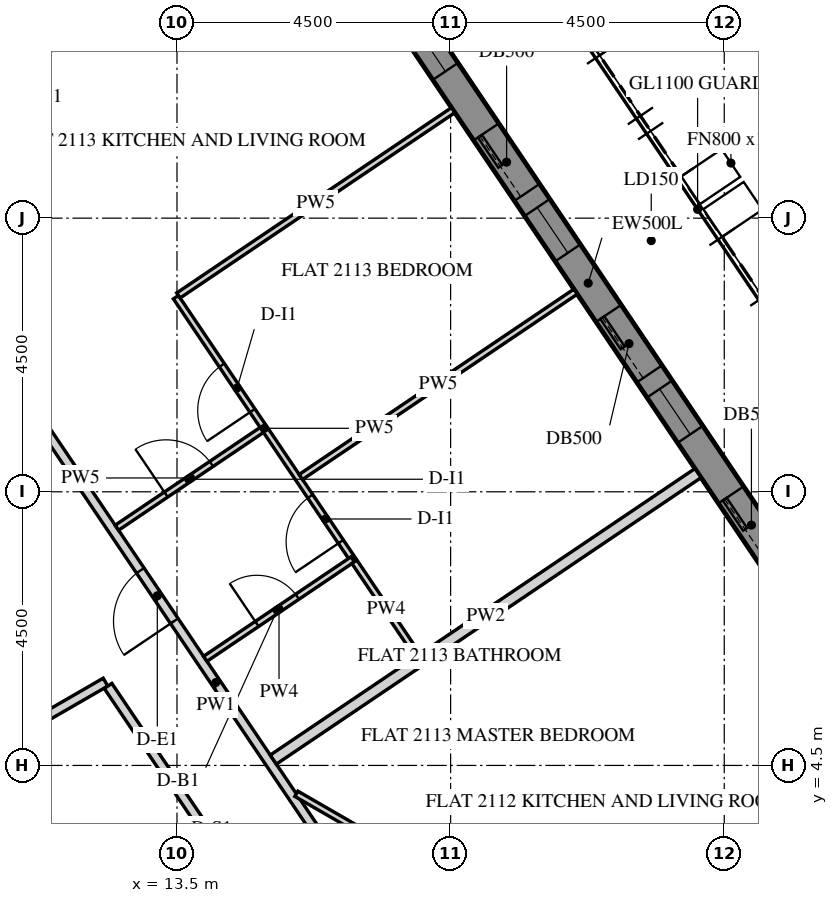
"""IFC4 building model, lengths in metres.
Left out: names, types, materials, properties, quantities, classifications, styles, units other than length and angle.
Written with IfcOpenShell. Run it as: python <this file> out.ifc"""

import sys

from ifc_helpers import new_model, si_unit, direction, frame, frame_2d, origin, place, context, subcontext, project, spatial, polyline, rectangle, outline, extrude, element, fill, save


model = new_model("IFC4")
c1 = context("Model", 3, precision=1e-05, world=origin(), true_north=direction((0.0, 1.0)))
c2 = subcontext(c1, "Body", "Model", "MODEL_VIEW")
j1 = project(units=[si_unit("LENGTHUNIT", "METRE"), si_unit("PLANEANGLEUNIT", "RADIAN")], contexts=[c1])
p1 = place(None, origin())
s1 = spatial("IfcSite", under=j1, at=p1, CompositionType="ELEMENT")
p2 = place(p1, origin())
s2 = spatial("IfcBuilding", under=s1, at=p2, CompositionType="ELEMENT")
p3 = place(p2, frame((0.0, 0.0, 267.9)))
s3 = spatial("IfcBuildingStorey", under=s2, at=p3, CompositionType="ELEMENT", Elevation=267.9)
p4 = place(p3, frame((26.706, 2.879, -0.15), z_axis=(0.0, 0.0, 1.0), x_axis=(-0.559197891507, 0.829034208061, 0.0)))
e1 = element("IfcWall", 1, at=p4, inside=s3, PredefinedType="SOLIDWALL", context=c2, shape_type="SweptSolid", body=[
    extrude(outline(polyline([(0.25, -0.25), (22.795, -0.25), (23.295, 0.25), (-0.25, 0.25), (0.25, -0.25)])), origin(), (0.0, 0.0, 1.0), 3.9),
])
p5 = place(p4, frame((1.323, 0.0, 1.05)))
e2 = element("IfcOpeningElement", 2, at=p5, cuts=e1, PredefinedType="OPENING", context=c2, shape_type="SweptSolid", body=[
    extrude(rectangle(XDim=0.9, YDim=1.5, at=frame_2d((0.45, 0.75))), frame((0.0, 0.26, 0.0), z_axis=(0.0, -1.0, 0.0), x_axis=(1.0, 0.0, 0.0)), (0.0, 0.0, 1.0), 0.52),
])
p6 = place(p4, frame((2.522, 0.0, 0.15)))
e3 = element("IfcOpeningElement", 3, at=p6, cuts=e1, PredefinedType="OPENING", context=c2, shape_type="SweptSolid", body=[
    extrude(rectangle(XDim=1.2, YDim=2.4, at=frame_2d((0.6, 1.2))), frame((0.0, 0.26, 0.0), z_axis=(0.0, -1.0, 0.0), x_axis=(1.0, 0.0, 0.0)), (0.0, 0.0, 1.0), 0.52),
])
p7 = place(p4, frame((4.922, 0.0, 1.05)))
e4 = element("IfcOpeningElement", 4, at=p7, cuts=e1, PredefinedType="OPENING", context=c2, shape_type="SweptSolid", body=[
    extrude(rectangle(XDim=0.9, YDim=1.5, at=frame_2d((0.45, 0.75))), frame((0.0, 0.26, 0.0), z_axis=(0.0, -1.0, 0.0), x_axis=(1.0, 0.0, 0.0)), (0.0, 0.0, 1.0), 0.52),
])
p8 = place(p4, frame((6.122, 0.0, 0.15)))
e5 = element("IfcOpeningElement", 5, at=p8, cuts=e1, PredefinedType="OPENING", context=c2, shape_type="SweptSolid", body=[
    extrude(rectangle(XDim=1.2, YDim=2.4, at=frame_2d((0.6, 1.2))), frame((0.0, 0.26, 0.0), z_axis=(0.0, -1.0, 0.0), x_axis=(1.0, 0.0, 0.0)), (0.0, 0.0, 1.0), 0.52),
])
p9 = place(p4, frame((8.522, 0.0, 1.05)))
e6 = element("IfcOpeningElement", 6, at=p9, cuts=e1, PredefinedType="OPENING", context=c2, shape_type="SweptSolid", body=[
    extrude(rectangle(XDim=0.9, YDim=1.5, at=frame_2d((0.45, 0.75))), frame((0.0, 0.26, 0.0), z_axis=(0.0, -1.0, 0.0), x_axis=(1.0, 0.0, 0.0)), (0.0, 0.0, 1.0), 0.52),
])
p10 = place(p4, frame((9.722, 0.0, 0.15)))
e7 = element("IfcOpeningElement", 7, at=p10, cuts=e1, PredefinedType="OPENING", context=c2, shape_type="SweptSolid", body=[
    extrude(rectangle(XDim=1.2, YDim=2.4, at=frame_2d((0.6, 1.2))), frame((0.0, 0.26, 0.0), z_axis=(0.0, -1.0, 0.0), x_axis=(1.0, 0.0, 0.0)), (0.0, 0.0, 1.0), 0.52),
])
p11 = place(p4, frame((12.122, 0.0, 1.05)))
e8 = element("IfcOpeningElement", 8, at=p11, cuts=e1, PredefinedType="OPENING", context=c2, shape_type="SweptSolid", body=[
    extrude(rectangle(XDim=0.9, YDim=1.5, at=frame_2d((0.45, 0.75))), frame((0.0, 0.26, 0.0), z_axis=(0.0, -1.0, 0.0), x_axis=(1.0, 0.0, 0.0)), (0.0, 0.0, 1.0), 0.52),
])
p12 = place(p4, frame((13.323, 0.0, 0.15)))
e9 = element("IfcOpeningElement", 9, at=p12, cuts=e1, PredefinedType="OPENING", context=c2, shape_type="SweptSolid", body=[
    extrude(rectangle(XDim=1.2, YDim=2.4, at=frame_2d((0.6, 1.2))), frame((0.0, 0.26, 0.0), z_axis=(0.0, -1.0, 0.0), x_axis=(1.0, 0.0, 0.0)), (0.0, 0.0, 1.0), 0.52),
])
p13 = place(p4, frame((15.722, 0.0, 1.05)))
e10 = element("IfcOpeningElement", 10, at=p13, cuts=e1, PredefinedType="OPENING", context=c2, shape_type="SweptSolid", body=[
    extrude(rectangle(XDim=0.9, YDim=1.5, at=frame_2d((0.45, 0.75))), frame((0.0, 0.26, 0.0), z_axis=(0.0, -1.0, 0.0), x_axis=(1.0, 0.0, 0.0)), (0.0, 0.0, 1.0), 0.52),
])
p14 = place(p4, frame((16.922, 0.0, 0.15)))
e11 = element("IfcOpeningElement", 11, at=p14, cuts=e1, PredefinedType="OPENING", context=c2, shape_type="SweptSolid", body=[
    extrude(rectangle(XDim=1.2, YDim=2.4, at=frame_2d((0.6, 1.2))), frame((0.0, 0.26, 0.0), z_axis=(0.0, -1.0, 0.0), x_axis=(1.0, 0.0, 0.0)), (0.0, 0.0, 1.0), 0.52),
])
p15 = place(p4, frame((19.323, 0.0, 1.05)))
e12 = element("IfcOpeningElement", 12, at=p15, cuts=e1, PredefinedType="OPENING", context=c2, shape_type="SweptSolid", body=[
    extrude(rectangle(XDim=0.9, YDim=1.5, at=frame_2d((0.45, 0.75))), frame((0.0, 0.26, 0.0), z_axis=(0.0, -1.0, 0.0), x_axis=(1.0, 0.0, 0.0)), (0.0, 0.0, 1.0), 0.52),
])
p16 = place(p4, frame((20.522, 0.0, 0.15)))
e13 = element("IfcOpeningElement", 13, at=p16, cuts=e1, PredefinedType="OPENING", context=c2, shape_type="SweptSolid", body=[
    extrude(rectangle(XDim=1.2, YDim=2.4, at=frame_2d((0.6, 1.2))), frame((0.0, 0.26, 0.0), z_axis=(0.0, -1.0, 0.0), x_axis=(1.0, 0.0, 0.0)), (0.0, 0.0, 1.0), 0.52),
])
p17 = place(p3, frame((12.471, 0.0, -0.15), z_axis=(0.0, 0.0, 1.0), x_axis=(-0.499996419489, 0.866027470984, 0.0)))
e14 = element("IfcWall", 14, at=p17, inside=s3, PredefinedType="SHEAR", context=c2, shape_type="SweptSolid", body=[
    extrude(outline(polyline([(-0.115, -0.2), (12.586, -0.2), (12.355, 0.2), (0.115, 0.2), (-0.115, -0.2)])), origin(), (0.0, 0.0, 1.0), 3.9),
])
p18 = place(p17, frame((5.306, 0.0, 0.15)))
e15 = element("IfcOpeningElement", 15, at=p18, cuts=e14, PredefinedType="OPENING", context=c2, shape_type="SweptSolid", body=[
    extrude(rectangle(XDim=1.8, YDim=2.4, at=frame_2d((0.9, 1.2))), frame((0.0, 0.21, 0.0), z_axis=(0.0, -1.0, 0.0), x_axis=(1.0, 0.0, 0.0)), (0.0, 0.0, 1.0), 0.42),
])
p19 = place(p3, frame((6.351, 11.0, -0.15), z_axis=(0.0, 0.0, 1.0), x_axis=(0.499998894578, 0.866026041999, 0.0)))
e16 = element("IfcWall", 16, at=p19, inside=s3, PredefinedType="SHEAR", context=c2, shape_type="SweptSolid", body=[
    extrude(rectangle(XDim=15.544, YDim=0.4, at=frame_2d((7.772, 0.0))), origin(), (0.0, 0.0, 1.0), 3.9),
])
p20 = place(p19, frame((6.872, 0.0, 0.15)))
e17 = element("IfcOpeningElement", 17, at=p20, cuts=e16, PredefinedType="OPENING", context=c2, shape_type="SweptSolid", body=[
    extrude(rectangle(XDim=1.8, YDim=2.4, at=frame_2d((0.9, 1.2))), frame((0.0, 0.21, 0.0), z_axis=(0.0, -1.0, 0.0), x_axis=(1.0, 0.0, 0.0)), (0.0, 0.0, 1.0), 0.42),
])
p21 = place(p3, frame((18.875, -1.158, 0.0), z_axis=(0.0, 0.0, 1.0), x_axis=(-0.55919880344, 0.829033592945, 0.0)))
e18 = element("IfcWall", 18, at=p21, inside=s3, PredefinedType="PARTITIONING", context=c2, shape_type="SweptSolid", body=[
    extrude(rectangle(XDim=16.939, YDim=0.15, at=frame_2d((8.47, 0.0))), origin(), (0.0, 0.0, 1.0), 2.988),
])
p22 = place(p21, frame((9.69, 0.0, 0.0)))
e19 = element("IfcOpeningElement", 19, at=p22, cuts=e18, PredefinedType="OPENING", context=c2, shape_type="SweptSolid", body=[
    extrude(rectangle(XDim=1.0, YDim=2.1, at=frame_2d((0.5, 1.05))), frame((0.0, 0.085, 0.0), z_axis=(0.0, -1.0, 0.0), x_axis=(1.0, 0.0, 0.0)), (0.0, 0.0, 1.0), 0.17),
])
p23 = place(p3, frame((9.444, 12.957, 0.0), z_axis=(0.0, 0.0, 1.0), x_axis=(0.500004967958, 0.866022535513, 0.0)))
e20 = element("IfcWall", 20, at=p23, inside=s3, PredefinedType="PARTITIONING", context=c2, shape_type="SweptSolid", body=[
    extrude(rectangle(XDim=7.431, YDim=0.15, at=frame_2d((3.715, 0.0))), origin(), (0.0, 0.0, 1.0), 2.988),
])
p24 = place(p3, frame((10.066, 4.566, 0.0), z_axis=(0.0, 0.0, 1.0), x_axis=(0.866034402474, 0.499984413489, 0.0)))
e21 = element("IfcWall", 21, at=p24, inside=s3, PredefinedType="PARTITIONING", context=c2, shape_type="SweptSolid", body=[
    extrude(rectangle(XDim=2.608, YDim=0.15, at=frame_2d((1.304, 0.0))), origin(), (0.0, 0.0, 1.0), 2.988),
])
p25 = place(p3, frame((12.367, 5.808, 0.0), z_axis=(0.0, 0.0, 1.0), x_axis=(0.559187256666, -0.829041381345, 0.0)))
e22 = element("IfcWall", 22, at=p25, inside=s3, PredefinedType="PARTITIONING", context=c2, shape_type="SweptSolid", body=[
    extrude(rectangle(XDim=8.56, YDim=0.15, at=frame_2d((4.28, 0.0))), origin(), (0.0, 0.0, 1.0), 2.988),
])
p26 = place(p25, frame((3.83, 0.0, 0.0)))
e23 = element("IfcOpeningElement", 23, at=p26, cuts=e22, PredefinedType="OPENING", context=c2, shape_type="SweptSolid", body=[
    extrude(rectangle(XDim=0.9, YDim=2.1, at=frame_2d((0.45, 1.05))), frame((0.0, 0.085, 0.0), z_axis=(0.0, -1.0, 0.0), x_axis=(1.0, 0.0, 0.0)), (0.0, 0.0, 1.0), 0.17),
])
p27 = place(p3, frame((15.463, 4.034, 0.0), z_axis=(0.0, 0.0, 1.0), x_axis=(0.866033324905, -0.499986279965, 0.0)))
e24 = element("IfcWall", 24, at=p27, inside=s3, PredefinedType="PARTITIONING", context=c2, shape_type="SweptSolid", body=[
    extrude(rectangle(XDim=9.426, YDim=0.1, at=frame_2d((4.713, 0.0))), origin(), (0.0, 0.0, 1.0), 2.988),
])
p28 = place(p3, frame((22.069, 9.307, 0.0), z_axis=(0.0, 0.0, 1.0), x_axis=(-0.829046823816, -0.559179187668, 0.0)))
e25 = element("IfcWall", 25, at=p28, inside=s3, PredefinedType="PARTITIONING", context=c2, shape_type="SweptSolid", body=[
    extrude(rectangle(XDim=8.425, YDim=0.18, at=frame_2d((4.213, 0.0))), origin(), (0.0, 0.0, 1.0), 2.988),
])
p29 = place(p3, frame((12.511, 8.409, 0.0), z_axis=(0.0, 0.0, 1.0), x_axis=(0.829072128826, 0.559141668278, 0.0)))
e26 = element("IfcWall", 26, at=p29, inside=s3, PredefinedType="PARTITIONING", context=c2, shape_type="SweptSolid", body=[
    extrude(rectangle(XDim=2.925, YDim=0.1, at=frame_2d((1.462, 0.0))), origin(), (0.0, 0.0, 1.0), 2.988),
])
p30 = place(p29, frame((0.975, 0.0, 0.0)))
e27 = element("IfcOpeningElement", 27, at=p30, cuts=e26, PredefinedType="OPENING", context=c2, shape_type="SweptSolid", body=[
    extrude(rectangle(XDim=0.9, YDim=2.1, at=frame_2d((0.45, 1.05))), frame((0.0, 0.06, 0.0), z_axis=(0.0, -1.0, 0.0), x_axis=(1.0, 0.0, 0.0)), (0.0, 0.0, 1.0), 0.12),
])
p31 = place(p3, frame((16.392, 7.888, 0.0), z_axis=(0.0, 0.0, 1.0), x_axis=(-0.559208437152, 0.829027094743, 0.0)))
e28 = element("IfcWall", 28, at=p31, inside=s3, PredefinedType="PARTITIONING", context=c2, shape_type="SweptSolid", body=[
    extrude(rectangle(XDim=5.202, YDim=0.1, at=frame_2d((2.601, 0.0))), origin(), (0.0, 0.0, 1.0), 2.988),
])
p32 = place(p31, frame((0.352, 0.0, 0.0)))
e29 = element("IfcOpeningElement", 29, at=p32, cuts=e28, PredefinedType="OPENING", context=c2, shape_type="SweptSolid", body=[
    extrude(rectangle(XDim=0.9, YDim=2.1, at=frame_2d((0.45, 1.05))), frame((0.0, 0.06, 0.0), z_axis=(0.0, -1.0, 0.0), x_axis=(1.0, 0.0, 0.0)), (0.0, 0.0, 1.0), 0.12),
])
p33 = place(p31, frame((2.952, 0.0, 0.0)))
e30 = element("IfcOpeningElement", 30, at=p33, cuts=e28, PredefinedType="OPENING", context=c2, shape_type="SweptSolid", body=[
    extrude(rectangle(XDim=0.9, YDim=2.1, at=frame_2d((0.45, 1.05))), frame((0.0, 0.06, 0.0), z_axis=(0.0, -1.0, 0.0), x_axis=(1.0, 0.0, 0.0)), (0.0, 0.0, 1.0), 0.12),
])
p34 = place(p3, frame((13.524, 12.229, 0.0), z_axis=(0.0, 0.0, 1.0), x_axis=(0.829026245862, 0.559209695617, 0.0)))
e31 = element("IfcWall", 31, at=p34, inside=s3, PredefinedType="PARTITIONING", context=c2, shape_type="SweptSolid", body=[
    extrude(rectangle(XDim=5.45, YDim=0.1, at=frame_2d((2.725, 0.0))), origin(), (0.0, 0.0, 1.0), 2.988),
])
p35 = place(p3, frame((13.966, 6.254, 0.0), z_axis=(0.0, 0.0, 1.0), x_axis=(0.829046031219, 0.559180362781, 0.0)))
e32 = element("IfcWall", 32, at=p35, inside=s3, PredefinedType="PARTITIONING", context=c2, shape_type="SweptSolid", body=[
    extrude(rectangle(XDim=2.925, YDim=0.1, at=frame_2d((1.462, 0.0))), origin(), (0.0, 0.0, 1.0), 2.988),
])
p36 = place(p35, frame((1.025, 0.0, 0.0)))
e33 = element("IfcOpeningElement", 33, at=p36, cuts=e32, PredefinedType="OPENING", context=c2, shape_type="SweptSolid", body=[
    extrude(rectangle(XDim=0.8, YDim=2.1, at=frame_2d((0.4, 1.05))), frame((0.0, 0.06, 0.0), z_axis=(0.0, -1.0, 0.0), x_axis=(1.0, 0.0, 0.0)), (0.0, 0.0, 1.0), 0.12),
])
p37 = place(p3, frame((17.458, 6.306, 0.0), z_axis=(0.0, 0.0, 1.0), x_axis=(-0.559200351269, 0.829032548903, 0.0)))
e34 = element("IfcWall", 34, at=p37, inside=s3, PredefinedType="PARTITIONING", context=c2, shape_type="SweptSolid", body=[
    extrude(rectangle(XDim=1.862, YDim=0.1, at=frame_2d((0.931, 0.0))), origin(), (0.0, 0.0, 1.0), 2.988),
])
p38 = place(p3, frame((20.055, 12.292, 0.0), z_axis=(0.0, 0.0, 1.0), x_axis=(-0.829040254016, -0.559188928021, 0.0)))
e35 = element("IfcWall", 35, at=p38, inside=s3, PredefinedType="PARTITIONING", context=c2, shape_type="SweptSolid", body=[
    extrude(rectangle(XDim=5.45, YDim=0.1, at=frame_2d((2.725, 0.0))), origin(), (0.0, 0.0, 1.0), 2.988),
])
p39 = place(p8, frame((0.0, 0.175, 0.0)))
e36 = element("IfcDoor", 36, at=p39, inside=s3, OperationType="SLIDING_TO_LEFT", PredefinedType="DOOR", context=c2, shape_type="SweptSolid", body=[
    extrude(rectangle(XDim=1.2, YDim=2.4, at=frame_2d((0.6, 1.2))), frame((0.0, 0.025, 0.0), z_axis=(0.0, -1.0, 0.0), x_axis=(1.0, 0.0, 0.0)), (0.0, 0.0, 1.0), 0.05),
])
fill(e5, e36)
p40 = place(p9, frame((0.0, 0.18, 0.0)))
e37 = element("IfcWindow", 37, at=p40, inside=s3, PartitioningType="SINGLE_PANEL", PredefinedType="WINDOW", context=c2, shape_type="SweptSolid", body=[
    extrude(rectangle(XDim=0.9, YDim=1.5, at=frame_2d((0.45, 0.75))), frame((0.0, 0.03, 0.0), z_axis=(0.0, -1.0, 0.0), x_axis=(1.0, 0.0, 0.0)), (0.0, 0.0, 1.0), 0.06),
])
fill(e6, e37)
p41 = place(p10, frame((0.0, 0.175, 0.0)))
e38 = element("IfcDoor", 38, at=p41, inside=s3, OperationType="SLIDING_TO_LEFT", PredefinedType="DOOR", context=c2, shape_type="SweptSolid", body=[
    extrude(rectangle(XDim=1.2, YDim=2.4, at=frame_2d((0.6, 1.2))), frame((0.0, 0.025, 0.0), z_axis=(0.0, -1.0, 0.0), x_axis=(1.0, 0.0, 0.0)), (0.0, 0.0, 1.0), 0.05),
])
fill(e7, e38)
p42 = place(p11, frame((0.0, 0.18, 0.0)))
e39 = element("IfcWindow", 39, at=p42, inside=s3, PartitioningType="SINGLE_PANEL", PredefinedType="WINDOW", context=c2, shape_type="SweptSolid", body=[
    extrude(rectangle(XDim=0.9, YDim=1.5, at=frame_2d((0.45, 0.75))), frame((0.0, 0.03, 0.0), z_axis=(0.0, -1.0, 0.0), x_axis=(1.0, 0.0, 0.0)), (0.0, 0.0, 1.0), 0.06),
])
fill(e8, e39)
p43 = place(p12, frame((0.0, 0.175, 0.0)))
e40 = element("IfcDoor", 40, at=p43, inside=s3, OperationType="SLIDING_TO_LEFT", PredefinedType="DOOR", context=c2, shape_type="SweptSolid", body=[
    extrude(rectangle(XDim=1.2, YDim=2.4, at=frame_2d((0.6, 1.2))), frame((0.0, 0.025, 0.0), z_axis=(0.0, -1.0, 0.0), x_axis=(1.0, 0.0, 0.0)), (0.0, 0.0, 1.0), 0.05),
])
fill(e9, e40)
p44 = place(p13, frame((0.0, 0.18, 0.0)))
e41 = element("IfcWindow", 41, at=p44, inside=s3, PartitioningType="SINGLE_PANEL", PredefinedType="WINDOW", context=c2, shape_type="SweptSolid", body=[
    extrude(rectangle(XDim=0.9, YDim=1.5, at=frame_2d((0.45, 0.75))), frame((0.0, 0.03, 0.0), z_axis=(0.0, -1.0, 0.0), x_axis=(1.0, 0.0, 0.0)), (0.0, 0.0, 1.0), 0.06),
])
fill(e10, e41)
p45 = place(p22, origin())
e42 = element("IfcDoor", 42, at=p45, inside=s3, OperationType="SINGLE_SWING_RIGHT", PredefinedType="DOOR", context=c2, shape_type="SweptSolid", body=[
    extrude(rectangle(XDim=1.0, YDim=2.1, at=frame_2d((0.5, 1.05))), frame((0.0, 0.025, 0.0), z_axis=(0.0, -1.0, 0.0), x_axis=(1.0, 0.0, 0.0)), (0.0, 0.0, 1.0), 0.05),
])
fill(e19, e42)
p46 = place(p36, origin())
e43 = element("IfcDoor", 43, at=p46, inside=s3, OperationType="SINGLE_SWING_RIGHT", PredefinedType="DOOR", context=c2, shape_type="SweptSolid", body=[
    extrude(rectangle(XDim=0.8, YDim=2.1, at=frame_2d((0.4, 1.05))), frame((0.0, 0.025, 0.0), z_axis=(0.0, -1.0, 0.0), x_axis=(1.0, 0.0, 0.0)), (0.0, 0.0, 1.0), 0.05),
])
fill(e33, e43)
p47 = place(p30, origin())
e44 = element("IfcDoor", 44, at=p47, inside=s3, OperationType="SINGLE_SWING_RIGHT", PredefinedType="DOOR", context=c2, shape_type="SweptSolid", body=[
    extrude(rectangle(XDim=0.9, YDim=2.1, at=frame_2d((0.45, 1.05))), frame((0.0, 0.025, 0.0), z_axis=(0.0, -1.0, 0.0), x_axis=(1.0, 0.0, 0.0)), (0.0, 0.0, 1.0), 0.05),
])
fill(e27, e44)
p48 = place(p32, origin())
e45 = element("IfcDoor", 45, at=p48, inside=s3, OperationType="SINGLE_SWING_LEFT", PredefinedType="DOOR", context=c2, shape_type="SweptSolid", body=[
    extrude(rectangle(XDim=0.9, YDim=2.1, at=frame_2d((0.45, 1.05))), frame((0.0, 0.025, 0.0), z_axis=(0.0, -1.0, 0.0), x_axis=(1.0, 0.0, 0.0)), (0.0, 0.0, 1.0), 0.05),
])
fill(e29, e45)
p49 = place(p33, origin())
e46 = element("IfcDoor", 46, at=p49, inside=s3, OperationType="SINGLE_SWING_RIGHT", PredefinedType="DOOR", context=c2, shape_type="SweptSolid", body=[
    extrude(rectangle(XDim=0.9, YDim=2.1, at=frame_2d((0.45, 1.05))), frame((0.0, 0.025, 0.0), z_axis=(0.0, -1.0, 0.0), x_axis=(1.0, 0.0, 0.0)), (0.0, 0.0, 1.0), 0.05),
])
fill(e30, e46)
save(model, sys.argv[1])
